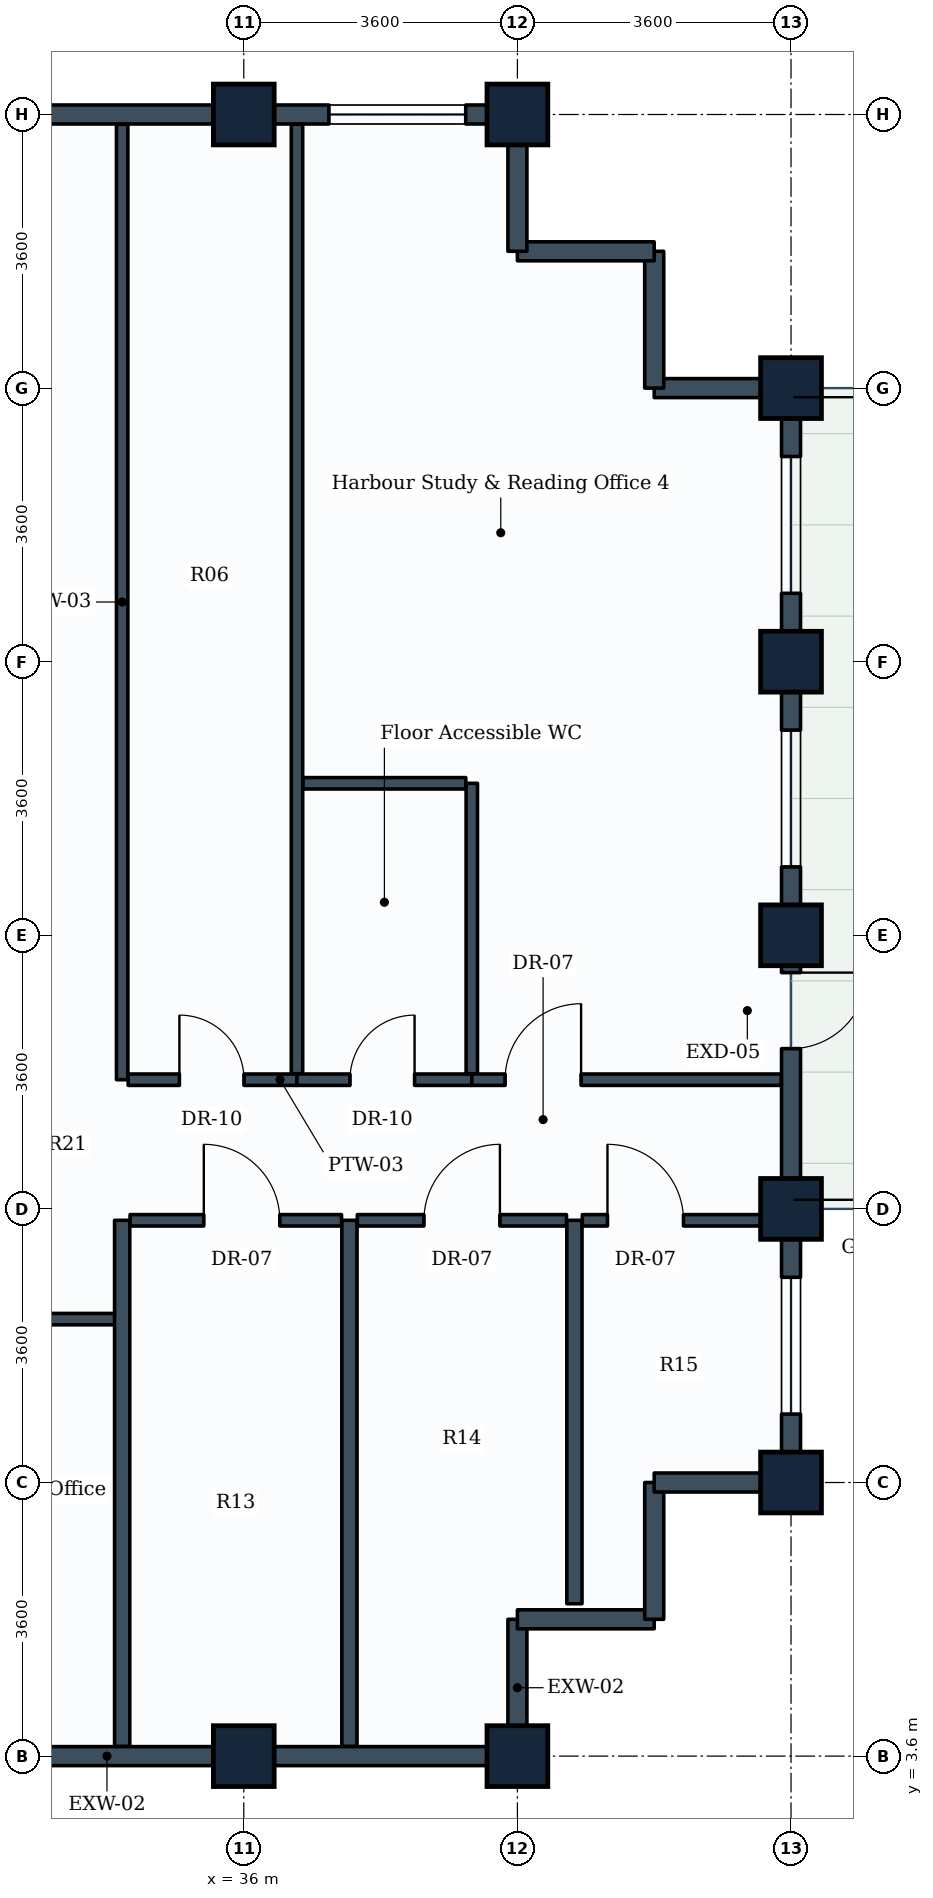
"""IFC4 building model, lengths in metres.
Left out: names, types, materials, properties, quantities, classifications, styles, units other than length and angle.
Written with IfcOpenShell. Run it as: python <this file> out.ifc"""

import sys

from ifc_helpers import new_model, si_unit, direction, frame, frame_2d, origin, origin_2d, place, context, subcontext, project, spatial, rectangle, extrude, element, fill, save


model = new_model("IFC4")
c1 = context("Model", 3, precision=1e-05, world=origin(), true_north=direction((0.0, 1.0)))
c2 = subcontext(c1, "Body", "Model", "MODEL_VIEW")
j1 = project(units=[si_unit("LENGTHUNIT", "METRE"), si_unit("PLANEANGLEUNIT", "RADIAN")], contexts=[c1])
p1 = place(None, origin())
s1 = spatial("IfcSite", under=j1, at=p1, CompositionType="ELEMENT")
p2 = place(p1, origin())
s2 = spatial("IfcBuilding", under=s1, at=p2, CompositionType="ELEMENT")
p3 = place(p2, frame((0.0, 0.0, 228.2)))
s3 = spatial("IfcBuildingStorey", under=s2, at=p3, CompositionType="ELEMENT", Elevation=228.2)
for number, where, z_axis, x_axis in (
    (1, (36.0, 3.6, 0.0), (0.0, 0.0, 1.0), (1.0, 0.0, 0.0)),
    (2, (36.0, 25.2, 0.0), (0.0, 0.0, 1.0), (1.0, 0.0, 0.0)),
    (3, (39.6, 3.6, 0.0), (0.0, 0.0, 1.0), (1.0, 0.0, 0.0)),
    (4, (39.6, 25.2, 0.0), (0.0, 0.0, 1.0), (1.0, 0.0, 0.0)),
    (5, (43.2, 7.2, 0.0), (0.0, 0.0, 1.0), (1.0, 0.0, 0.0)),
    (6, (43.2, 10.8, 0.0), (0.0, 0.0, 1.0), (0.0, 1.0, 0.0)),
    (7, (43.2, 14.4, 0.0), (0.0, 0.0, 1.0), (0.0, 1.0, 0.0)),
    (8, (43.2, 18.0, 0.0), (0.0, 0.0, 1.0), (0.0, 1.0, 0.0)),
    (9, (43.2, 21.6, 0.0), (0.0, 0.0, 1.0), (0.0, 1.0, 0.0)),
):
    element("IfcColumn", number, at=place(p3, frame(where, z_axis=z_axis, x_axis=x_axis)), inside=s3, PredefinedType="COLUMN", context=c2, shape_type="SweptSolid", body=[
        extrude(rectangle(XDim=0.8, YDim=0.8, at=origin_2d()), origin(), (0.0, 0.0, 1.0), 3.6),
    ])
for number, where, z_axis, x_axis in (
    (10, (36.0, 3.6, 0.0), (0.0, 0.0, 1.0), (-1.0, 0.0, 0.0)),
    (11, (39.6, 3.6, 0.0), (0.0, 0.0, 1.0), (-1.0, 0.0, 0.0)),
):
    element("IfcWall", number, at=place(p3, frame(where, z_axis=z_axis, x_axis=x_axis)), inside=s3, PredefinedType="STANDARD", context=c2, shape_type="SweptSolid", body=[
        extrude(rectangle(XDim=3.6, YDim=0.25, at=frame_2d((1.8, 0.0))), origin(), (0.0, 0.0, 1.0), 2.83),
    ])
p4 = place(p3, frame((39.6, 5.4, 0.0), z_axis=(0.0, 0.0, 1.0), x_axis=(0.0, -1.0, 0.0)))
e12 = element("IfcWall", 12, at=p4, inside=s3, PredefinedType="STANDARD", context=c2, shape_type="SweptSolid", body=[
    extrude(rectangle(XDim=1.8, YDim=0.25, at=frame_2d((0.9, 0.0))), origin(), (0.0, 0.0, 1.0), 2.83),
])
p5 = place(p3, frame((41.4, 5.4, 0.0), z_axis=(0.0, 0.0, 1.0), x_axis=(-1.0, 0.0, 0.0)))
e13 = element("IfcWall", 13, at=p5, inside=s3, PredefinedType="STANDARD", context=c2, shape_type="SweptSolid", body=[
    extrude(rectangle(XDim=1.8, YDim=0.25, at=frame_2d((0.9, 0.0))), origin(), (0.0, 0.0, 1.0), 3.335),
])
p6 = place(p3, frame((41.4, 7.2, 0.0), z_axis=(0.0, 0.0, 1.0), x_axis=(0.0, -1.0, 0.0)))
e14 = element("IfcWall", 14, at=p6, inside=s3, PredefinedType="STANDARD", context=c2, shape_type="SweptSolid", body=[
    extrude(rectangle(XDim=1.8, YDim=0.25, at=frame_2d((0.9, 0.0))), origin(), (0.0, 0.0, 1.0), 3.335),
])
p7 = place(p3, frame((43.2, 7.2, 0.0), z_axis=(0.0, 0.0, 1.0), x_axis=(-1.0, 0.0, 0.0)))
e15 = element("IfcWall", 15, at=p7, inside=s3, PredefinedType="STANDARD", context=c2, shape_type="SweptSolid", body=[
    extrude(rectangle(XDim=1.8, YDim=0.25, at=frame_2d((0.9, 0.0))), origin(), (0.0, 0.0, 1.0), 2.83),
])
p8 = place(p3, frame((43.2, 10.8, 0.0), z_axis=(0.0, 0.0, 1.0), x_axis=(0.0, -1.0, 0.0)))
e16 = element("IfcWall", 16, at=p8, inside=s3, PredefinedType="STANDARD", context=c2, shape_type="SweptSolid", body=[
    extrude(rectangle(XDim=3.6, YDim=0.25, at=frame_2d((1.8, 0.0))), origin(), (0.0, 0.0, 1.0), 2.83),
])
p9 = place(p8, frame((0.9, 0.0, 0.85)))
e17 = element("IfcOpeningElement", 17, at=p9, cuts=e16, PredefinedType="OPENING", context=c2, shape_type="SweptSolid", body=[
    extrude(rectangle(XDim=1.8, YDim=1.35, at=frame_2d((0.9, 0.675))), frame((0.0, 0.135, 0.0), z_axis=(0.0, -1.0, 0.0), x_axis=(1.0, 0.0, 0.0)), (0.0, 0.0, 1.0), 0.27),
])
p10 = place(p3, frame((43.2, 14.4, 0.0), z_axis=(0.0, 0.0, 1.0), x_axis=(0.0, -1.0, 0.0)))
e18 = element("IfcWall", 18, at=p10, inside=s3, PredefinedType="STANDARD", context=c2, shape_type="SweptSolid", body=[
    extrude(rectangle(XDim=3.6, YDim=0.25, at=frame_2d((1.8, 0.0))), origin(), (0.0, 0.0, 1.0), 2.83),
])
p11 = place(p10, frame((0.491, 0.0, 0.0)))
e19 = element("IfcOpeningElement", 19, at=p11, cuts=e18, PredefinedType="OPENING", context=c2, shape_type="SweptSolid", body=[
    extrude(rectangle(XDim=1.0, YDim=2.1, at=frame_2d((0.5, 1.05))), frame((0.0, 0.135, 0.0), z_axis=(0.0, -1.0, 0.0), x_axis=(1.0, 0.0, 0.0)), (0.0, 0.0, 1.0), 0.27),
])
p12 = place(p3, frame((43.2, 18.0, 0.0), z_axis=(0.0, 0.0, 1.0), x_axis=(0.0, -1.0, 0.0)))
e20 = element("IfcWall", 20, at=p12, inside=s3, PredefinedType="STANDARD", context=c2, shape_type="SweptSolid", body=[
    extrude(rectangle(XDim=3.6, YDim=0.25, at=frame_2d((1.8, 0.0))), origin(), (0.0, 0.0, 1.0), 2.83),
])
p13 = place(p12, frame((0.9, 0.0, 0.85)))
e21 = element("IfcOpeningElement", 21, at=p13, cuts=e20, PredefinedType="OPENING", context=c2, shape_type="SweptSolid", body=[
    extrude(rectangle(XDim=1.8, YDim=1.35, at=frame_2d((0.9, 0.675))), frame((0.0, 0.135, 0.0), z_axis=(0.0, -1.0, 0.0), x_axis=(1.0, 0.0, 0.0)), (0.0, 0.0, 1.0), 0.27),
])
p14 = place(p3, frame((43.2, 21.6, 0.0), z_axis=(0.0, 0.0, 1.0), x_axis=(0.0, -1.0, 0.0)))
e22 = element("IfcWall", 22, at=p14, inside=s3, PredefinedType="STANDARD", context=c2, shape_type="SweptSolid", body=[
    extrude(rectangle(XDim=3.6, YDim=0.25, at=frame_2d((1.8, 0.0))), origin(), (0.0, 0.0, 1.0), 2.83),
])
p15 = place(p14, frame((0.9, 0.0, 0.85)))
e23 = element("IfcOpeningElement", 23, at=p15, cuts=e22, PredefinedType="OPENING", context=c2, shape_type="SweptSolid", body=[
    extrude(rectangle(XDim=1.8, YDim=1.35, at=frame_2d((0.9, 0.675))), frame((0.0, 0.135, 0.0), z_axis=(0.0, -1.0, 0.0), x_axis=(1.0, 0.0, 0.0)), (0.0, 0.0, 1.0), 0.27),
])
p16 = place(p3, frame((41.4, 21.6, 0.0), z_axis=(0.0, 0.0, 1.0), x_axis=(1.0, 0.0, 0.0)))
e24 = element("IfcWall", 24, at=p16, inside=s3, PredefinedType="STANDARD", context=c2, shape_type="SweptSolid", body=[
    extrude(rectangle(XDim=1.8, YDim=0.25, at=frame_2d((0.9, 0.0))), origin(), (0.0, 0.0, 1.0), 2.83),
])
for number, where, z_axis, x_axis in (
    (25, (41.4, 23.4, 0.0), (0.0, 0.0, 1.0), (0.0, -1.0, 0.0)),
    (26, (39.6, 23.4, 0.0), (0.0, 0.0, 1.0), (1.0, 0.0, 0.0)),
):
    element("IfcWall", number, at=place(p3, frame(where, z_axis=z_axis, x_axis=x_axis)), inside=s3, PredefinedType="STANDARD", context=c2, shape_type="SweptSolid", body=[
        extrude(rectangle(XDim=1.8, YDim=0.25, at=frame_2d((0.9, 0.0))), origin(), (0.0, 0.0, 1.0), 3.335),
    ])
p17 = place(p3, frame((39.6, 25.2, 0.0), z_axis=(0.0, 0.0, 1.0), x_axis=(0.0, -1.0, 0.0)))
e27 = element("IfcWall", 27, at=p17, inside=s3, PredefinedType="STANDARD", context=c2, shape_type="SweptSolid", body=[
    extrude(rectangle(XDim=1.8, YDim=0.25, at=frame_2d((0.9, 0.0))), origin(), (0.0, 0.0, 1.0), 2.83),
])
p18 = place(p3, frame((36.0, 25.2, 0.0), z_axis=(0.0, 0.0, 1.0), x_axis=(1.0, 0.0, 0.0)))
e28 = element("IfcWall", 28, at=p18, inside=s3, PredefinedType="STANDARD", context=c2, shape_type="SweptSolid", body=[
    extrude(rectangle(XDim=3.6, YDim=0.25, at=frame_2d((1.8, 0.0))), origin(), (0.0, 0.0, 1.0), 2.83),
])
p19 = place(p18, frame((1.12, 0.0, 0.85)))
e29 = element("IfcOpeningElement", 29, at=p19, cuts=e28, PredefinedType="OPENING", context=c2, shape_type="SweptSolid", body=[
    extrude(rectangle(XDim=1.8, YDim=1.35, at=frame_2d((0.9, 0.675))), frame((0.0, 0.135, 0.0), z_axis=(0.0, -1.0, 0.0), x_axis=(1.0, 0.0, 0.0)), (0.0, 0.0, 1.0), 0.27),
])
p20 = place(p3, frame((32.4, 25.2, 0.0), z_axis=(0.0, 0.0, 1.0), x_axis=(1.0, 0.0, 0.0)))
e30 = element("IfcWall", 30, at=p20, inside=s3, PredefinedType="STANDARD", context=c2, shape_type="SweptSolid", body=[
    extrude(rectangle(XDim=3.6, YDim=0.25, at=frame_2d((1.8, 0.0))), origin(), (0.0, 0.0, 1.0), 2.83),
])
p21 = place(p3, frame((34.4, 12.5, 0.0), z_axis=(0.0, 0.0, 1.0), x_axis=(0.0, 1.0, 0.0)))
e31 = element("IfcWall", 31, at=p21, inside=s3, PredefinedType="PARTITIONING", context=c2, shape_type="SweptSolid", body=[
    extrude(rectangle(XDim=12.571, YDim=0.15, at=frame_2d((6.286, 0.0))), origin(), (0.0, 0.0, 1.0), 2.83),
])
p22 = place(p3, frame((34.479, 12.5, 0.0), z_axis=(0.0, 0.0, 1.0), x_axis=(1.0, 0.0, 0.0)))
e32 = element("IfcWall", 32, at=p22, inside=s3, PredefinedType="PARTITIONING", context=c2, shape_type="SweptSolid", body=[
    extrude(rectangle(XDim=2.221, YDim=0.15, at=frame_2d((1.11, 0.0))), origin(), (0.0, 0.0, 1.0), 3.02),
])
p23 = place(p22, frame((0.674, 0.0, 0.0)))
e33 = element("IfcOpeningElement", 33, at=p23, cuts=e32, PredefinedType="OPENING", context=c2, shape_type="SweptSolid", body=[
    extrude(rectangle(XDim=0.85, YDim=2.1, at=frame_2d((0.425, 1.05))), frame((0.0, 0.085, 0.0), z_axis=(0.0, -1.0, 0.0), x_axis=(1.0, 0.0, 0.0)), (0.0, 0.0, 1.0), 0.17),
])
p24 = place(p3, frame((36.7, 12.579, 0.0), z_axis=(0.0, 0.0, 1.0), x_axis=(0.0, 1.0, 0.0)))
e34 = element("IfcWall", 34, at=p24, inside=s3, PredefinedType="PARTITIONING", context=c2, shape_type="SweptSolid", body=[
    extrude(rectangle(XDim=12.492, YDim=0.15, at=frame_2d((6.246, 0.0))), origin(), (0.0, 0.0, 1.0), 2.83),
])
p25 = place(p3, frame((36.7, 12.5, 0.0), z_axis=(0.0, 0.0, 1.0), x_axis=(1.0, 0.0, 0.0)))
e35 = element("IfcWall", 35, at=p25, inside=s3, PredefinedType="PARTITIONING", context=c2, shape_type="SweptSolid", body=[
    extrude(rectangle(XDim=2.3, YDim=0.15, at=frame_2d((1.15, 0.0))), origin(), (0.0, 0.0, 1.0), 3.335),
])
p26 = place(p25, frame((0.697, 0.0, 0.0)))
e36 = element("IfcOpeningElement", 36, at=p26, cuts=e35, PredefinedType="OPENING", context=c2, shape_type="SweptSolid", body=[
    extrude(rectangle(XDim=0.85, YDim=2.1, at=frame_2d((0.425, 1.05))), frame((0.0, 0.085, 0.0), z_axis=(0.0, -1.0, 0.0), x_axis=(1.0, 0.0, 0.0)), (0.0, 0.0, 1.0), 0.17),
])
p27 = place(p3, frame((39.0, 12.579, 0.0), z_axis=(0.0, 0.0, 1.0), x_axis=(0.0, 1.0, 0.0)))
e37 = element("IfcWall", 37, at=p27, inside=s3, PredefinedType="PARTITIONING", context=c2, shape_type="SweptSolid", body=[
    extrude(rectangle(XDim=3.821, YDim=0.15, at=frame_2d((1.91, 0.0))), origin(), (0.0, 0.0, 1.0), 3.03),
])
p28 = place(p3, frame((36.779, 16.4, 0.0), z_axis=(0.0, 0.0, 1.0), x_axis=(1.0, 0.0, 0.0)))
e38 = element("IfcWall", 38, at=p28, inside=s3, PredefinedType="PARTITIONING", context=c2, shape_type="SweptSolid", body=[
    extrude(rectangle(XDim=2.142, YDim=0.15, at=frame_2d((1.071, 0.0))), origin(), (0.0, 0.0, 1.0), 3.335),
])
p29 = place(p3, frame((28.879, 9.35, 0.0), z_axis=(0.0, 0.0, 1.0), x_axis=(1.0, 0.0, 0.0)))
e39 = element("IfcWall", 39, at=p29, inside=s3, PredefinedType="PARTITIONING", context=c2, shape_type="SweptSolid", body=[
    extrude(rectangle(XDim=5.521, YDim=0.15, at=frame_2d((2.76, 0.0))), origin(), (0.0, 0.0, 1.0), 3.335),
])
p30 = place(p29, frame((0.36, 0.0, 0.0)))
e40 = element("IfcOpeningElement", 40, at=p30, cuts=e39, PredefinedType="OPENING", context=c2, shape_type="SweptSolid", body=[
    extrude(rectangle(XDim=1.0, YDim=2.1, at=frame_2d((0.5, 1.05))), frame((0.0, 0.085, 0.0), z_axis=(0.0, -1.0, 0.0), x_axis=(1.0, 0.0, 0.0)), (0.0, 0.0, 1.0), 0.17),
])
for number, where, z_axis, x_axis in (
    (41, (34.4, 3.729, 0.0), (0.0, 0.0, 1.0), (0.0, 1.0, 0.0)),
    (42, (37.39, 3.729, 0.0), (0.0, 0.0, 1.0), (0.0, 1.0, 0.0)),
):
    element("IfcWall", number, at=place(p3, frame(where, z_axis=z_axis, x_axis=x_axis)), inside=s3, PredefinedType="PARTITIONING", context=c2, shape_type="SweptSolid", body=[
        extrude(rectangle(XDim=6.921, YDim=0.2, at=frame_2d((3.46, 0.0))), origin(), (0.0, 0.0, 1.0), 2.83),
    ])
p31 = place(p3, frame((34.504, 10.65, 0.0), z_axis=(0.0, 0.0, 1.0), x_axis=(1.0, 0.0, 0.0)))
e43 = element("IfcWall", 43, at=p31, inside=s3, PredefinedType="PARTITIONING", context=c2, shape_type="SweptSolid", body=[
    extrude(rectangle(XDim=2.782, YDim=0.15, at=frame_2d((1.391, 0.0))), origin(), (0.0, 0.0, 1.0), 3.02),
])
p32 = place(p31, frame((0.97, 0.0, 0.0)))
e44 = element("IfcOpeningElement", 44, at=p32, cuts=e43, PredefinedType="OPENING", context=c2, shape_type="SweptSolid", body=[
    extrude(rectangle(XDim=1.0, YDim=2.1, at=frame_2d((0.5, 1.05))), frame((0.0, 0.085, 0.0), z_axis=(0.0, -1.0, 0.0), x_axis=(1.0, 0.0, 0.0)), (0.0, 0.0, 1.0), 0.17),
])
p33 = place(p3, frame((40.35, 5.605, 0.0), z_axis=(0.0, 0.0, 1.0), x_axis=(0.0, 1.0, 0.0)))
e45 = element("IfcWall", 45, at=p33, inside=s3, PredefinedType="PARTITIONING", context=c2, shape_type="SweptSolid", body=[
    extrude(rectangle(XDim=5.045, YDim=0.2, at=frame_2d((2.522, 0.0))), origin(), (0.0, 0.0, 1.0), 3.335),
])
p34 = place(p3, frame((37.494, 10.65, 0.0), z_axis=(0.0, 0.0, 1.0), x_axis=(1.0, 0.0, 0.0)))
e46 = element("IfcWall", 46, at=p34, inside=s3, PredefinedType="PARTITIONING", context=c2, shape_type="SweptSolid", body=[
    extrude(rectangle(XDim=2.752, YDim=0.15, at=frame_2d((1.376, 0.0))), origin(), (0.0, 0.0, 1.0), 3.335),
])
p35 = place(p34, frame((0.876, 0.0, 0.0)))
e47 = element("IfcOpeningElement", 47, at=p35, cuts=e46, PredefinedType="OPENING", context=c2, shape_type="SweptSolid", body=[
    extrude(rectangle(XDim=1.0, YDim=2.1, at=frame_2d((0.5, 1.05))), frame((0.0, 0.085, 0.0), z_axis=(0.0, -1.0, 0.0), x_axis=(1.0, 0.0, 0.0)), (0.0, 0.0, 1.0), 0.17),
])
p36 = place(p3, frame((40.454, 10.65, 0.0), z_axis=(0.0, 0.0, 1.0), x_axis=(1.0, 0.0, 0.0)))
e48 = element("IfcWall", 48, at=p36, inside=s3, PredefinedType="PARTITIONING", context=c2, shape_type="SweptSolid", body=[
    extrude(rectangle(XDim=2.617, YDim=0.15, at=frame_2d((1.309, 0.0))), origin(), (0.0, 0.0, 1.0), 2.83),
])
p37 = place(p36, frame((0.331, 0.0, 0.0)))
e49 = element("IfcOpeningElement", 49, at=p37, cuts=e48, PredefinedType="OPENING", context=c2, shape_type="SweptSolid", body=[
    extrude(rectangle(XDim=1.0, YDim=2.1, at=frame_2d((0.5, 1.05))), frame((0.0, 0.085, 0.0), z_axis=(0.0, -1.0, 0.0), x_axis=(1.0, 0.0, 0.0)), (0.0, 0.0, 1.0), 0.17),
])
p38 = place(p3, frame((39.0, 12.5, 0.0), z_axis=(0.0, 0.0, 1.0), x_axis=(1.0, 0.0, 0.0)))
e50 = element("IfcWall", 50, at=p38, inside=s3, PredefinedType="PARTITIONING", context=c2, shape_type="SweptSolid", body=[
    extrude(rectangle(XDim=4.071, YDim=0.15, at=frame_2d((2.036, 0.0))), origin(), (0.0, 0.0, 1.0), 2.83),
])
p39 = place(p38, frame((0.438, 0.0, 0.0)))
e51 = element("IfcOpeningElement", 51, at=p39, cuts=e50, PredefinedType="OPENING", context=c2, shape_type="SweptSolid", body=[
    extrude(rectangle(XDim=1.0, YDim=2.1, at=frame_2d((0.5, 1.05))), frame((0.0, 0.085, 0.0), z_axis=(0.0, -1.0, 0.0), x_axis=(1.0, 0.0, 0.0)), (0.0, 0.0, 1.0), 0.17),
])
p40 = place(p9, origin())
e52 = element("IfcWindow", 52, at=p40, inside=s3, PartitioningType="SINGLE_PANEL", PredefinedType="WINDOW", context=c2, shape_type="SweptSolid", body=[
    extrude(rectangle(XDim=1.8, YDim=1.35, at=frame_2d((0.9, 0.675))), frame((0.0, 0.03, 0.0), z_axis=(0.0, -1.0, 0.0), x_axis=(1.0, 0.0, 0.0)), (0.0, 0.0, 1.0), 0.06),
])
fill(e17, e52)
p41 = place(p11, origin())
e53 = element("IfcDoor", 53, at=p41, inside=s3, OperationType="SINGLE_SWING_LEFT", PredefinedType="DOOR", context=c2, shape_type="SweptSolid", body=[
    extrude(rectangle(XDim=1.0, YDim=2.1, at=frame_2d((0.5, 1.05))), frame((0.0, 0.025, 0.0), z_axis=(0.0, -1.0, 0.0), x_axis=(1.0, 0.0, 0.0)), (0.0, 0.0, 1.0), 0.05),
])
fill(e19, e53)
p42 = place(p13, origin())
e54 = element("IfcWindow", 54, at=p42, inside=s3, PartitioningType="SINGLE_PANEL", PredefinedType="WINDOW", context=c2, shape_type="SweptSolid", body=[
    extrude(rectangle(XDim=1.8, YDim=1.35, at=frame_2d((0.9, 0.675))), frame((0.0, 0.03, 0.0), z_axis=(0.0, -1.0, 0.0), x_axis=(1.0, 0.0, 0.0)), (0.0, 0.0, 1.0), 0.06),
])
fill(e21, e54)
p43 = place(p15, origin())
e55 = element("IfcWindow", 55, at=p43, inside=s3, PartitioningType="SINGLE_PANEL", PredefinedType="WINDOW", context=c2, shape_type="SweptSolid", body=[
    extrude(rectangle(XDim=1.8, YDim=1.35, at=frame_2d((0.9, 0.675))), frame((0.0, 0.03, 0.0), z_axis=(0.0, -1.0, 0.0), x_axis=(1.0, 0.0, 0.0)), (0.0, 0.0, 1.0), 0.06),
])
fill(e23, e55)
p44 = place(p19, origin())
e56 = element("IfcWindow", 56, at=p44, inside=s3, PartitioningType="SINGLE_PANEL", PredefinedType="WINDOW", context=c2, shape_type="SweptSolid", body=[
    extrude(rectangle(XDim=1.8, YDim=1.35, at=frame_2d((0.9, 0.675))), frame((0.0, 0.03, 0.0), z_axis=(0.0, -1.0, 0.0), x_axis=(1.0, 0.0, 0.0)), (0.0, 0.0, 1.0), 0.06),
])
fill(e29, e56)
p45 = place(p23, origin())
e57 = element("IfcDoor", 57, at=p45, inside=s3, OperationType="SINGLE_SWING_LEFT", PredefinedType="DOOR", context=c2, shape_type="SweptSolid", body=[
    extrude(rectangle(XDim=0.85, YDim=2.1, at=frame_2d((0.425, 1.05))), frame((0.0, 0.025, 0.0), z_axis=(0.0, -1.0, 0.0), x_axis=(1.0, 0.0, 0.0)), (0.0, 0.0, 1.0), 0.05),
])
fill(e33, e57)
p46 = place(p26, origin())
e58 = element("IfcDoor", 58, at=p46, inside=s3, OperationType="SINGLE_SWING_RIGHT", PredefinedType="DOOR", context=c2, shape_type="SweptSolid", body=[
    extrude(rectangle(XDim=0.85, YDim=2.1, at=frame_2d((0.425, 1.05))), frame((0.0, 0.025, 0.0), z_axis=(0.0, -1.0, 0.0), x_axis=(1.0, 0.0, 0.0)), (0.0, 0.0, 1.0), 0.05),
])
fill(e36, e58)
p47 = place(p32, origin())
e59 = element("IfcDoor", 59, at=p47, inside=s3, OperationType="SINGLE_SWING_LEFT", PredefinedType="DOOR", context=c2, shape_type="SweptSolid", body=[
    extrude(rectangle(XDim=1.0, YDim=2.1, at=frame_2d((0.5, 1.05))), frame((0.0, 0.025, 0.0), z_axis=(0.0, -1.0, 0.0), x_axis=(1.0, 0.0, 0.0)), (0.0, 0.0, 1.0), 0.05),
])
fill(e44, e59)
p48 = place(p35, origin())
e60 = element("IfcDoor", 60, at=p48, inside=s3, OperationType="SINGLE_SWING_RIGHT", PredefinedType="DOOR", context=c2, shape_type="SweptSolid", body=[
    extrude(rectangle(XDim=1.0, YDim=2.1, at=frame_2d((0.5, 1.05))), frame((0.0, 0.025, 0.0), z_axis=(0.0, -1.0, 0.0), x_axis=(1.0, 0.0, 0.0)), (0.0, 0.0, 1.0), 0.05),
])
fill(e47, e60)
p49 = place(p37, origin())
e61 = element("IfcDoor", 61, at=p49, inside=s3, OperationType="SINGLE_SWING_LEFT", PredefinedType="DOOR", context=c2, shape_type="SweptSolid", body=[
    extrude(rectangle(XDim=1.0, YDim=2.1, at=frame_2d((0.5, 1.05))), frame((0.0, 0.025, 0.0), z_axis=(0.0, -1.0, 0.0), x_axis=(1.0, 0.0, 0.0)), (0.0, 0.0, 1.0), 0.05),
])
fill(e49, e61)
p50 = place(p39, origin())
e62 = element("IfcDoor", 62, at=p50, inside=s3, OperationType="SINGLE_SWING_RIGHT", PredefinedType="DOOR", context=c2, shape_type="SweptSolid", body=[
    extrude(rectangle(XDim=1.0, YDim=2.1, at=frame_2d((0.5, 1.05))), frame((0.0, 0.025, 0.0), z_axis=(0.0, -1.0, 0.0), x_axis=(1.0, 0.0, 0.0)), (0.0, 0.0, 1.0), 0.05),
])
fill(e51, e62)
save(model, sys.argv[1])
